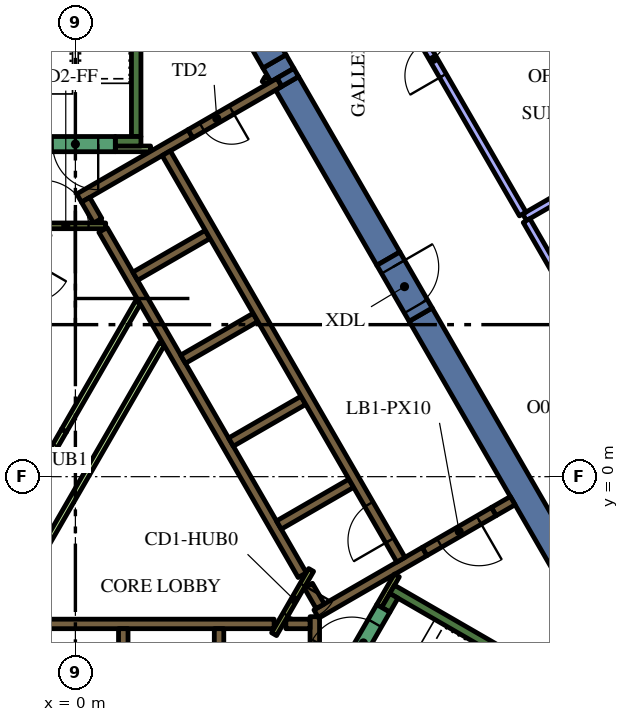
"""IFC4 building model, lengths in metres.
Left out: names, types, materials, properties, quantities, classifications, styles, units other than length and angle.
Written with IfcOpenShell. Run it as: python <this file> out.ifc"""

import sys

from ifc_helpers import new_model, si_unit, direction, frame, frame_2d, origin, place, context, subcontext, project, spatial, polyline, rectangle, outline, extrude, element, fill, save


model = new_model("IFC4")
c1 = context("Model", 3, precision=1e-05, world=origin(), true_north=direction((0.0, 1.0)))
c2 = subcontext(c1, "Body", "Model", "MODEL_VIEW")
j1 = project(units=[si_unit("LENGTHUNIT", "METRE"), si_unit("PLANEANGLEUNIT", "RADIAN")], contexts=[c1])
p1 = place(None, origin())
s1 = spatial("IfcSite", under=j1, at=p1, CompositionType="ELEMENT")
p2 = place(p1, origin())
s2 = spatial("IfcBuilding", under=s1, at=p2, CompositionType="ELEMENT")
p3 = place(p2, frame((0.0, 0.0, 218.4)))
s3 = spatial("IfcBuildingStorey", under=s2, at=p3, CompositionType="ELEMENT", Elevation=218.4)
p4 = place(p3, frame((9.085, 4.264, 0.0), z_axis=(0.0, 0.0, 1.0), x_axis=(0.499998082512, -0.866026510844, 0.0)))
e1 = element("IfcWall", 1, at=p4, inside=s3, PredefinedType="SOLIDWALL", context=c2, shape_type="SweptSolid", body=[
    extrude(rectangle(XDim=12.472, YDim=0.7, at=frame_2d((6.236, 0.0))), origin(), (0.0, 0.0, 1.0), 4.2),
])
p5 = place(p3, frame((5.445, 10.569, 0.0), z_axis=(0.0, 0.0, 1.0), x_axis=(-0.500218351069, 0.865899302029, 0.0)))
e2 = element("IfcWall", 2, at=p5, inside=s3, PredefinedType="SOLIDWALL", context=c2, shape_type="SweptSolid", body=[
    extrude(rectangle(XDim=0.412, YDim=0.7, at=frame_2d((0.206, 0.0))), origin(), (0.0, 0.0, 1.0), 4.2),
])
p6 = place(p3, frame((5.571, 10.35, 0.0), z_axis=(0.0, 0.0, 1.0), x_axis=(0.499968379186, -0.8660436593, 0.0)))
e3 = element("IfcWall", 3, at=p6, inside=s3, PredefinedType="SOLIDWALL", context=c2, shape_type="SweptSolid", body=[
    extrude(rectangle(XDim=5.328, YDim=0.7, at=frame_2d((2.664, 0.0))), origin(), (0.0, 0.0, 1.0), 4.2),
])
p7 = place(p3, origin())
e4 = element("IfcWall", 4, at=p7, inside=s3, PredefinedType="SOLIDWALL", context=c2, shape_type="SweptSolid", body=[
    extrude(outline(polyline([(5.432, 10.272), (5.308, 10.487), (5.749, 10.742), (5.873, 10.527), (5.432, 10.272)])), origin(), (0.0, 0.0, 1.0), 4.2),
])
p8 = place(p3, frame((5.238, 10.927, 0.0), z_axis=(0.0, 0.0, 1.0), x_axis=(-0.499985607887, 0.866033712915, 0.0)))
e5 = element("IfcWall", 5, at=p8, inside=s3, PredefinedType="SOLIDWALL", context=c2, shape_type="SweptSolid", body=[
    extrude(rectangle(XDim=6.478, YDim=0.7, at=frame_2d((3.239, 0.0))), origin(), (0.0, 0.0, 1.0), 4.2),
])
p9 = place(p3, frame((8.334, -2.964, 0.0), z_axis=(0.0, 0.0, 1.0), x_axis=(0.866016039709, -0.500016218704, 0.0)))
e6 = element("IfcWall", 6, at=p9, inside=s3, PredefinedType="SOLIDWALL", context=c2, shape_type="SweptSolid", body=[
    extrude(rectangle(XDim=7.05, YDim=0.25, at=frame_2d((3.525, 0.0))), origin(), (0.0, 0.0, 1.0), 4.2),
])
p10 = place(p3, frame((8.168, -3.503, 0.0), z_axis=(0.0, 0.0, 1.0), x_axis=(0.49972245349, 0.866185586049, 0.0)))
e7 = element("IfcWall", 7, at=p10, inside=s3, PredefinedType="SOLIDWALL", context=c2, shape_type="SweptSolid", body=[
    extrude(rectangle(XDim=0.425, YDim=0.25, at=frame_2d((0.212, 0.0))), origin(), (0.0, 0.0, 1.0), 4.2),
])
p11 = place(p3, frame((1.6, 8.95, 0.0), z_axis=(0.0, 0.0, 1.0), x_axis=(0.0, 1.0, 0.0)))
e8 = element("IfcWall", 8, at=p11, inside=s3, PredefinedType="SOLIDWALL", context=c2, shape_type="SweptSolid", body=[
    extrude(rectangle(XDim=6.8, YDim=0.25, at=frame_2d((3.4, 0.0))), origin(), (0.0, 0.0, 1.0), 4.2),
])
p12 = place(p3, frame((1.05, 8.825, 0.0), z_axis=(0.0, 0.0, 1.0), x_axis=(1.0, 0.0, 0.0)))
e9 = element("IfcWall", 9, at=p12, inside=s3, PredefinedType="SOLIDWALL", context=c2, shape_type="SweptSolid", body=[
    extrude(rectangle(XDim=0.675, YDim=0.25, at=frame_2d((0.337, 0.0))), origin(), (0.0, 0.0, 1.0), 4.2),
])
p13 = place(p3, frame((-5.259, -3.875, 0.0), z_axis=(0.0, 0.0, 1.0), x_axis=(1.0, 0.0, 0.0)))
e10 = element("IfcWall", 10, at=p13, inside=s3, PredefinedType="SOLIDWALL", context=c2, shape_type="SweptSolid", body=[
    extrude(rectangle(XDim=10.489, YDim=0.25, at=frame_2d((5.244, 0.0))), origin(), (0.0, 0.0, 1.0), 4.2),
])
for number, where, z_axis, x_axis in (
    (11, (3.78, -4.0, 0.0), (0.0, 0.0, 1.0), (0.0, -1.0, 0.0)),
    (12, (1.26, -4.0, 0.0), (0.0, 0.0, 1.0), (0.0, -1.0, 0.0)),
):
    element("IfcWall", number, at=place(p3, frame(where, z_axis=z_axis, x_axis=x_axis)), inside=s3, PredefinedType="SOLIDWALL", context=c2, shape_type="SweptSolid", body=[
        extrude(rectangle(XDim=2.2, YDim=0.25, at=frame_2d((1.1, 0.0))), origin(), (0.0, 0.0, 1.0), 4.2),
    ])
p14 = place(p3, frame((6.3, -7.24, 0.0), z_axis=(0.0, 0.0, 1.0), x_axis=(0.0, 1.0, 0.0)))
e13 = element("IfcWall", 13, at=p14, inside=s3, PredefinedType="SOLIDWALL", context=c2, shape_type="SweptSolid", body=[
    extrude(rectangle(XDim=3.556, YDim=0.25, at=frame_2d((1.778, 0.0))), origin(), (0.0, 0.0, 1.0), 4.2),
])
p15 = place(p3, frame((5.538, -3.875, 0.0), z_axis=(0.0, 0.0, 1.0), x_axis=(1.0, 0.0, 0.0)))
e14 = element("IfcWall", 14, at=p15, inside=s3, PredefinedType="SOLIDWALL", context=c2, shape_type="SweptSolid", body=[
    extrude(rectangle(XDim=0.637, YDim=0.25, at=frame_2d((0.318, 0.0))), origin(), (0.0, 0.0, 1.0), 4.2),
])
p16 = place(p3, frame((9.19, -1.969, 0.0), z_axis=(0.0, 0.0, 1.0), x_axis=(-0.866057109641, -0.499945079824, 0.0)))
e15 = element("IfcWall", 15, at=p16, inside=s3, PredefinedType="SOLIDWALL", context=c2, shape_type="SweptSolid", body=[
    extrude(rectangle(XDim=3.291, YDim=0.25, at=frame_2d((1.646, 0.0))), origin(), (0.0, 0.0, 1.0), 4.2),
])
p17 = place(p3, frame((6.13, -2.867, 0.0), z_axis=(0.0, 0.0, 1.0), x_axis=(0.500160776593, -0.865932559475, 0.0)))
e16 = element("IfcWall", 16, at=p17, inside=s3, PredefinedType="SOLIDWALL", context=c2, shape_type="SweptSolid", body=[
    extrude(rectangle(XDim=0.627, YDim=0.25, at=frame_2d((0.313, 0.0))), origin(), (0.0, 0.0, 1.0), 4.2),
])
p18 = place(p3, frame((11.507, -0.631, 0.0), z_axis=(0.0, 0.0, 1.0), x_axis=(-0.866093731455, -0.499881634324, 0.0)))
e17 = element("IfcWall", 17, at=p18, inside=s3, PredefinedType="SOLIDWALL", context=c2, shape_type="SweptSolid", body=[
    extrude(rectangle(XDim=0.575, YDim=0.25, at=frame_2d((0.288, 0.0))), origin(), (0.0, 0.0, 1.0), 4.2),
])
p19 = place(p3, frame((3.028, 9.023, 0.0), z_axis=(0.0, 0.0, 1.0), x_axis=(-0.866036587186, -0.49998062928, 0.0)))
e18 = element("IfcWall", 18, at=p19, inside=s3, PredefinedType="SOLIDWALL", context=c2, shape_type="SweptSolid", body=[
    extrude(rectangle(XDim=3.384, YDim=0.25, at=frame_2d((1.692, 0.0))), origin(), (0.0, 0.0, 1.0), 4.2),
])
p20 = place(p3, frame((0.268, 7.285, 0.0), z_axis=(0.0, 0.0, 1.0), x_axis=(0.500098681536, -0.865968422476, 0.0)))
e19 = element("IfcWall", 19, at=p20, inside=s3, PredefinedType="SOLIDWALL", context=c2, shape_type="SweptSolid", body=[
    extrude(rectangle(XDim=0.636, YDim=0.25, at=frame_2d((0.318, 0.0))), origin(), (0.0, 0.0, 1.0), 4.2),
])
p21 = place(p3, frame((5.97, -2.591, 0.0), z_axis=(0.0, 0.0, 1.0), x_axis=(-0.499994469932, 0.866028596547, 0.0)))
e20 = element("IfcWall", 20, at=p21, inside=s3, PredefinedType="SOLIDWALL", context=c2, shape_type="SweptSolid", body=[
    extrude(rectangle(XDim=10.488, YDim=0.25, at=frame_2d((5.244, 0.0))), origin(), (0.0, 0.0, 1.0), 4.2),
])
p22 = place(p3, frame((1.574, 5.274, 0.0), z_axis=(0.0, 0.0, 1.0), x_axis=(0.866028486751, 0.499994660107, 0.0)))
e21 = element("IfcWall", 21, at=p22, inside=s3, PredefinedType="SOLIDWALL", context=c2, shape_type="SweptSolid", body=[
    extrude(rectangle(XDim=2.2, YDim=0.25, at=frame_2d((1.1, 0.0))), origin(), (0.0, 0.0, 1.0), 4.2),
])
for number, where, z_axis, x_axis in (
    (22, (2.834, 3.091, 0.0), (0.0, 0.0, 1.0), (0.866, 0.5, 0.0)),
    (23, (4.094, 0.909, 0.0), (0.0, 0.0, 1.0), (0.866, 0.5, 0.0)),
    (24, (5.354, -1.274, 0.0), (0.0, 0.0, 1.0), (0.866, 0.5, 0.0)),
):
    element("IfcWall", number, at=place(p3, frame(where, z_axis=z_axis, x_axis=x_axis)), inside=s3, PredefinedType="SOLIDWALL", context=c2, shape_type="SweptSolid", body=[
        extrude(rectangle(XDim=2.2, YDim=0.25, at=frame_2d((1.1, 0.0))), origin(), (0.0, 0.0, 1.0), 4.2),
    ])
p23 = place(p3, frame((1.05, 8.625, 0.0), z_axis=(0.0, 0.0, 1.0), x_axis=(1.0, 0.0, 0.0)))
e25 = element("IfcWall", 25, at=p23, inside=s3, PredefinedType="PARTITIONING", context=c2, shape_type="SweptSolid", body=[
    extrude(rectangle(XDim=0.929, YDim=0.15, at=frame_2d((0.464, 0.0))), origin(), (0.0, 0.0, 1.0), 3.45),
])
p24 = place(p3, frame((4.98, 10.358, 0.0), z_axis=(0.0, 0.0, 1.0), x_axis=(0.500640202437, 0.86565546709, 0.0)))
e26 = element("IfcWall", 26, at=p24, inside=s3, PredefinedType="PARTITIONING", context=c2, shape_type="SweptSolid", body=[
    extrude(rectangle(XDim=0.146, YDim=0.15, at=frame_2d((0.073, 0.0))), origin(), (0.0, 0.0, 1.0), 3.45),
])
p25 = place(p3, frame((8.459, -2.599, 0.0), z_axis=(0.0, 0.0, 1.0), x_axis=(-0.500041054325, -0.866001699761, 0.0)))
e27 = element("IfcWall", 27, at=p25, inside=s3, PredefinedType="PARTITIONING", context=c2, shape_type="SweptSolid", body=[
    extrude(rectangle(XDim=0.929, YDim=0.15, at=frame_2d((0.464, 0.0))), origin(), (0.0, 0.0, 1.0), 4.2),
])
p26 = place(p3, frame((-1.887, -3.718, 0.0), z_axis=(0.0, 0.0, 1.0), x_axis=(0.500005008002, 0.866022512394, 0.0)))
e28 = element("IfcWall", 28, at=p26, inside=s3, PredefinedType="PARTITIONING", context=c2, shape_type="SweptSolid", body=[
    extrude(rectangle(XDim=8.327, YDim=0.15, at=frame_2d((4.164, 0.0))), origin(), (0.0, 0.0, 1.0), 3.45),
])
p27 = place(p3, frame((-0.3, 1.212, 0.0), z_axis=(0.0, 0.0, 1.0), x_axis=(0.499963101113, 0.866046706318, 0.0)))
e29 = element("IfcWall", 29, at=p27, inside=s3, PredefinedType="PARTITIONING", context=c2, shape_type="SweptSolid", body=[
    extrude(rectangle(XDim=3.893, YDim=0.15, at=frame_2d((1.947, 0.0))), origin(), (0.0, 0.0, 1.0), 3.45),
])
p28 = place(p3, frame((8.565, -2.185, 0.0), z_axis=(0.0, 0.0, 1.0), x_axis=(-0.499997954832, 0.866026584559, 0.0)))
e30 = element("IfcWall", 30, at=p28, inside=s3, PredefinedType="SOLIDWALL", context=c2, shape_type="SweptSolid", body=[
    extrude(rectangle(XDim=12.35, YDim=0.25, at=frame_2d((6.175, 0.0))), origin(), (0.0, 0.0, 1.0), 4.2),
])
p29 = place(p28, frame((0.585, 0.0, 0.0)))
e31 = element("IfcOpeningElement", 31, at=p29, cuts=e30, PredefinedType="OPENING", context=c2, shape_type="SweptSolid", body=[
    extrude(rectangle(XDim=1.1, YDim=2.1, at=frame_2d((0.55, 1.05))), frame((0.0, 0.135, 0.0), z_axis=(0.0, -1.0, 0.0), x_axis=(1.0, 0.0, 0.0)), (0.0, 0.0, 1.0), 0.27),
])
p30 = place(p3, frame((7.053, -5.284, 0.0), z_axis=(0.0, 0.0, 1.0), x_axis=(0.500078061341, 0.865980330357, 0.0)))
e32 = element("IfcWall", 32, at=p30, inside=s3, PredefinedType="SOLIDWALL", context=c2, shape_type="SweptSolid", body=[
    extrude(rectangle(XDim=2.1, YDim=0.4, at=frame_2d((1.05, 0.0))), origin(), (0.0, 0.0, 1.0), 4.2),
])
p31 = place(p30, frame((0.45, 0.0, 0.0)))
e33 = element("IfcOpeningElement", 33, at=p31, cuts=e32, PredefinedType="OPENING", context=c2, shape_type="SweptSolid", body=[
    extrude(rectangle(XDim=1.2, YDim=2.1, at=frame_2d((0.6, 1.05))), frame((0.0, 0.21, 0.0), z_axis=(0.0, -1.0, 0.0), x_axis=(1.0, 0.0, 0.0)), (0.0, 0.0, 1.0), 0.42),
])
p32 = place(p3, frame((1.05, 8.75, 0.0), z_axis=(0.0, 0.0, 1.0), x_axis=(-1.0, 0.0, 0.0)))
e34 = element("IfcWall", 34, at=p32, inside=s3, PredefinedType="SOLIDWALL", context=c2, shape_type="SweptSolid", body=[
    extrude(rectangle(XDim=2.1, YDim=0.4, at=frame_2d((1.05, 0.0))), origin(), (0.0, 0.0, 1.0), 4.2),
])
p33 = place(p32, frame((0.45, 0.0, 0.0)))
e35 = element("IfcOpeningElement", 35, at=p33, cuts=e34, PredefinedType="OPENING", context=c2, shape_type="SweptSolid", body=[
    extrude(rectangle(XDim=1.2, YDim=2.1, at=frame_2d((0.6, 1.05))), frame((0.0, 0.21, 0.0), z_axis=(0.0, -1.0, 0.0), x_axis=(1.0, 0.0, 0.0)), (0.0, 0.0, 1.0), 0.42),
])
p34 = place(p3, frame((5.366, 10.373, 0.0), z_axis=(0.0, 0.0, 1.0), x_axis=(-0.866019956843, -0.50000943426, 0.0)))
e36 = element("IfcWall", 36, at=p34, inside=s3, PredefinedType="SOLIDWALL", context=c2, shape_type="SweptSolid", body=[
    extrude(rectangle(XDim=2.7, YDim=0.25, at=frame_2d((1.35, 0.0))), origin(), (0.0, 0.0, 1.0), 4.2),
])
p35 = place(p34, frame((1.45, 0.0, 0.0)))
e37 = element("IfcOpeningElement", 37, at=p35, cuts=e36, PredefinedType="OPENING", context=c2, shape_type="SweptSolid", body=[
    extrude(rectangle(XDim=0.9, YDim=2.1, at=frame_2d((0.45, 1.05))), frame((0.0, 0.135, 0.0), z_axis=(0.0, -1.0, 0.0), x_axis=(1.0, 0.0, 0.0)), (0.0, 0.0, 1.0), 0.27),
])
p36 = place(p3, frame((6.203, -2.456, 0.0), z_axis=(0.0, 0.0, 1.0), x_axis=(-0.500043961785, -0.866000020948, 0.0)))
e38 = element("IfcWall", 38, at=p36, inside=s3, PredefinedType="PARTITIONING", context=c2, shape_type="SweptSolid", body=[
    extrude(rectangle(XDim=1.95, YDim=0.15, at=frame_2d((0.975, 0.0))), origin(), (0.0, 0.0, 1.0), 4.2),
])
p37 = place(p36, frame((0.45, 0.0, 0.0)))
e39 = element("IfcOpeningElement", 39, at=p37, cuts=e38, PredefinedType="OPENING", context=c2, shape_type="SweptSolid", body=[
    extrude(rectangle(XDim=0.9, YDim=2.1, at=frame_2d((0.45, 1.05))), frame((0.0, 0.085, 0.0), z_axis=(0.0, -1.0, 0.0), x_axis=(1.0, 0.0, 0.0)), (0.0, 0.0, 1.0), 0.17),
])
p38 = place(p3, frame((-1.303, 6.6, 0.0), z_axis=(0.0, 0.0, 1.0), x_axis=(1.0, 0.0, 0.0)))
e40 = element("IfcWall", 40, at=p38, inside=s3, PredefinedType="PARTITIONING", context=c2, shape_type="SweptSolid", body=[
    extrude(rectangle(XDim=2.1, YDim=0.15, at=frame_2d((1.05, 0.0))), origin(), (0.0, 0.0, 1.0), 4.2),
])
p39 = place(p38, frame((0.45, 0.0, 0.0)))
e41 = element("IfcOpeningElement", 41, at=p39, cuts=e40, PredefinedType="OPENING", context=c2, shape_type="SweptSolid", body=[
    extrude(rectangle(XDim=1.2, YDim=2.1, at=frame_2d((0.6, 1.05))), frame((0.0, 0.085, 0.0), z_axis=(0.0, -1.0, 0.0), x_axis=(1.0, 0.0, 0.0)), (0.0, 0.0, 1.0), 0.17),
])
p40 = place(p3, frame((11.009, -0.919, 0.0), z_axis=(0.0, 0.0, 1.0), x_axis=(-0.866059744384, -0.49994051562, 0.0)))
e42 = element("IfcWall", 42, at=p40, inside=s3, PredefinedType="SOLIDWALL", context=c2, shape_type="SweptSolid", body=[
    extrude(rectangle(XDim=2.1, YDim=0.25, at=frame_2d((1.05, 0.0))), origin(), (0.0, 0.0, 1.0), 4.2),
])
p41 = place(p40, frame((0.45, 0.0, 0.0)))
e43 = element("IfcOpeningElement", 43, at=p41, cuts=e42, PredefinedType="OPENING", context=c2, shape_type="SweptSolid", body=[
    extrude(rectangle(XDim=1.2, YDim=2.1, at=frame_2d((0.6, 1.05))), frame((0.0, 0.135, 0.0), z_axis=(0.0, -1.0, 0.0), x_axis=(1.0, 0.0, 0.0)), (0.0, 0.0, 1.0), 0.27),
])
p42 = place(p3, frame((8.235, 5.736, 0.0), z_axis=(0.0, 0.0, 1.0), x_axis=(0.499954529098, -0.86605165483, 0.0)))
e44 = element("IfcWall", 44, at=p42, inside=s3, PredefinedType="SOLIDWALL", context=c2, shape_type="SweptSolid", body=[
    extrude(rectangle(XDim=1.7, YDim=0.7, at=frame_2d((0.85, 0.0))), origin(), (0.0, 0.0, 1.0), 4.2),
])
p43 = place(p42, frame((0.25, 0.0, 0.0)))
e45 = element("IfcOpeningElement", 45, at=p43, cuts=e44, PredefinedType="OPENING", context=c2, shape_type="SweptSolid", body=[
    extrude(rectangle(XDim=1.2, YDim=2.1, at=frame_2d((0.6, 1.05))), frame((0.0, 0.36, 0.0), z_axis=(0.0, -1.0, 0.0), x_axis=(1.0, 0.0, 0.0)), (0.0, 0.0, 1.0), 0.72),
])
p44 = place(p3, frame((-1.2, -0.346, 0.0), z_axis=(0.0, 0.0, 1.0), x_axis=(0.499961193289, 0.866047807691, 0.0)))
e46 = element("IfcWall", 46, at=p44, inside=s3, PredefinedType="PARTITIONING", context=c2, shape_type="SweptSolid", body=[
    extrude(rectangle(XDim=1.8, YDim=0.15, at=frame_2d((0.9, 0.0))), origin(), (0.0, 0.0, 1.0), 3.45),
])
p45 = place(p44, frame((0.45, 0.0, 0.0)))
e47 = element("IfcOpeningElement", 47, at=p45, cuts=e46, PredefinedType="OPENING", context=c2, shape_type="SweptSolid", body=[
    extrude(rectangle(XDim=0.9, YDim=2.1, at=frame_2d((0.45, 1.05))), frame((0.0, 0.085, 0.0), z_axis=(0.0, -1.0, 0.0), x_axis=(1.0, 0.0, 0.0)), (0.0, 0.0, 1.0), 0.17),
])
p46 = place(p3, frame((11.821, 6.825, 0.0), z_axis=(0.0, 0.0, 1.0), x_axis=(0.866011792348, 0.500023574959, 0.0)))
e48 = element("IfcWall", 48, at=p46, inside=s3, PredefinedType="PARTITIONING", context=c2, shape_type="SweptSolid", body=[
    extrude(rectangle(XDim=5.381, YDim=0.2, at=frame_2d((2.69, 0.0))), origin(), (0.0, 0.0, 1.0), 3.45),
])
p47 = place(p3, frame((16.581, -1.419, 0.0), z_axis=(0.0, 0.0, 1.0), x_axis=(-0.500019350398, 0.866014231539, 0.0)))
e49 = element("IfcWall", 49, at=p47, inside=s3, PredefinedType="PARTITIONING", context=c2, shape_type="SweptSolid", body=[
    extrude(rectangle(XDim=9.42, YDim=0.2, at=frame_2d((4.71, 0.0))), origin(), (0.0, 0.0, 1.0), 3.45),
])
p48 = place(p47, frame((4.2, 0.0, 0.0)))
e50 = element("IfcOpeningElement", 50, at=p48, cuts=e49, PredefinedType="OPENING", context=c2, shape_type="SweptSolid", body=[
    extrude(rectangle(XDim=1.0, YDim=2.1, at=frame_2d((0.5, 1.05))), frame((0.0, 0.11, 0.0), z_axis=(0.0, -1.0, 0.0), x_axis=(1.0, 0.0, 0.0)), (0.0, 0.0, 1.0), 0.22),
])
p49 = place(p3, frame((11.771, 6.912, 0.0), z_axis=(0.0, 0.0, 1.0), x_axis=(-0.500008127286, 0.866020711443, 0.0)))
e51 = element("IfcWall", 51, at=p49, inside=s3, PredefinedType="PARTITIONING", context=c2, shape_type="SweptSolid", body=[
    extrude(rectangle(XDim=9.42, YDim=0.2, at=frame_2d((4.71, 0.0))), origin(), (0.0, 0.0, 1.0), 3.45),
])
p50 = place(p49, frame((4.2, 0.0, 0.0)))
e52 = element("IfcOpeningElement", 52, at=p50, cuts=e51, PredefinedType="OPENING", context=c2, shape_type="SweptSolid", body=[
    extrude(rectangle(XDim=1.0, YDim=2.1, at=frame_2d((0.5, 1.05))), frame((0.0, 0.11, 0.0), z_axis=(0.0, -1.0, 0.0), x_axis=(1.0, 0.0, 0.0)), (0.0, 0.0, 1.0), 0.22),
])
p51 = place(p29, origin())
e53 = element("IfcDoor", 53, at=p51, inside=s3, OperationType="DOUBLE_DOOR_SLIDING", PredefinedType="DOOR", context=c2, shape_type="SweptSolid", body=[
    extrude(rectangle(XDim=1.1, YDim=2.1, at=frame_2d((0.55, 1.05))), frame((0.0, 0.025, 0.0), z_axis=(0.0, -1.0, 0.0), x_axis=(1.0, 0.0, 0.0)), (0.0, 0.0, 1.0), 0.05),
])
fill(e31, e53)
p52 = place(p31, origin())
e54 = element("IfcDoor", 54, at=p52, inside=s3, OperationType="SINGLE_SWING_LEFT", PredefinedType="DOOR", context=c2, shape_type="SweptSolid", body=[
    extrude(rectangle(XDim=1.2, YDim=2.1, at=frame_2d((0.6, 1.05))), frame((0.0, 0.025, 0.0), z_axis=(0.0, -1.0, 0.0), x_axis=(1.0, 0.0, 0.0)), (0.0, 0.0, 1.0), 0.05),
])
fill(e33, e54)
p53 = place(p33, origin())
e55 = element("IfcDoor", 55, at=p53, inside=s3, OperationType="SINGLE_SWING_LEFT", PredefinedType="DOOR", context=c2, shape_type="SweptSolid", body=[
    extrude(rectangle(XDim=1.2, YDim=2.1, at=frame_2d((0.6, 1.05))), frame((0.0, 0.025, 0.0), z_axis=(0.0, -1.0, 0.0), x_axis=(1.0, 0.0, 0.0)), (0.0, 0.0, 1.0), 0.05),
])
fill(e35, e55)
p54 = place(p35, origin())
e56 = element("IfcDoor", 56, at=p54, inside=s3, OperationType="SINGLE_SWING_LEFT", PredefinedType="DOOR", context=c2, shape_type="SweptSolid", body=[
    extrude(rectangle(XDim=0.9, YDim=2.1, at=frame_2d((0.45, 1.05))), frame((0.0, 0.025, 0.0), z_axis=(0.0, -1.0, 0.0), x_axis=(1.0, 0.0, 0.0)), (0.0, 0.0, 1.0), 0.05),
])
fill(e37, e56)
p55 = place(p37, origin())
e57 = element("IfcDoor", 57, at=p55, inside=s3, OperationType="SINGLE_SWING_LEFT", PredefinedType="DOOR", context=c2, shape_type="SweptSolid", body=[
    extrude(rectangle(XDim=0.9, YDim=2.1, at=frame_2d((0.45, 1.05))), frame((0.0, 0.025, 0.0), z_axis=(0.0, -1.0, 0.0), x_axis=(1.0, 0.0, 0.0)), (0.0, 0.0, 1.0), 0.05),
])
fill(e39, e57)
p56 = place(p39, origin())
e58 = element("IfcDoor", 58, at=p56, inside=s3, OperationType="SINGLE_SWING_LEFT", PredefinedType="DOOR", context=c2, shape_type="SweptSolid", body=[
    extrude(rectangle(XDim=1.2, YDim=2.1, at=frame_2d((0.6, 1.05))), frame((0.0, 0.025, 0.0), z_axis=(0.0, -1.0, 0.0), x_axis=(1.0, 0.0, 0.0)), (0.0, 0.0, 1.0), 0.05),
])
fill(e41, e58)
p57 = place(p41, origin())
e59 = element("IfcDoor", 59, at=p57, inside=s3, OperationType="SINGLE_SWING_LEFT", PredefinedType="DOOR", context=c2, shape_type="SweptSolid", body=[
    extrude(rectangle(XDim=1.2, YDim=2.1, at=frame_2d((0.6, 1.05))), frame((0.0, 0.025, 0.0), z_axis=(0.0, -1.0, 0.0), x_axis=(1.0, 0.0, 0.0)), (0.0, 0.0, 1.0), 0.05),
])
fill(e43, e59)
p58 = place(p43, origin())
e60 = element("IfcDoor", 60, at=p58, inside=s3, OperationType="SINGLE_SWING_LEFT", PredefinedType="DOOR", context=c2, shape_type="SweptSolid", body=[
    extrude(rectangle(XDim=1.2, YDim=2.1, at=frame_2d((0.6, 1.05))), frame((0.0, 0.025, 0.0), z_axis=(0.0, -1.0, 0.0), x_axis=(1.0, 0.0, 0.0)), (0.0, 0.0, 1.0), 0.05),
])
fill(e45, e60)
p59 = place(p45, origin())
e61 = element("IfcDoor", 61, at=p59, inside=s3, OperationType="SINGLE_SWING_LEFT", PredefinedType="DOOR", context=c2, shape_type="SweptSolid", body=[
    extrude(rectangle(XDim=0.9, YDim=2.1, at=frame_2d((0.45, 1.05))), frame((0.0, 0.025, 0.0), z_axis=(0.0, -1.0, 0.0), x_axis=(1.0, 0.0, 0.0)), (0.0, 0.0, 1.0), 0.05),
])
fill(e47, e61)
p60 = place(p50, origin())
e62 = element("IfcDoor", 62, at=p60, inside=s3, OperationType="SINGLE_SWING_LEFT", PredefinedType="DOOR", context=c2, shape_type="SweptSolid", body=[
    extrude(rectangle(XDim=1.0, YDim=2.1, at=frame_2d((0.5, 1.05))), frame((0.0, 0.025, 0.0), z_axis=(0.0, -1.0, 0.0), x_axis=(1.0, 0.0, 0.0)), (0.0, 0.0, 1.0), 0.05),
])
fill(e52, e62)
save(model, sys.argv[1])
